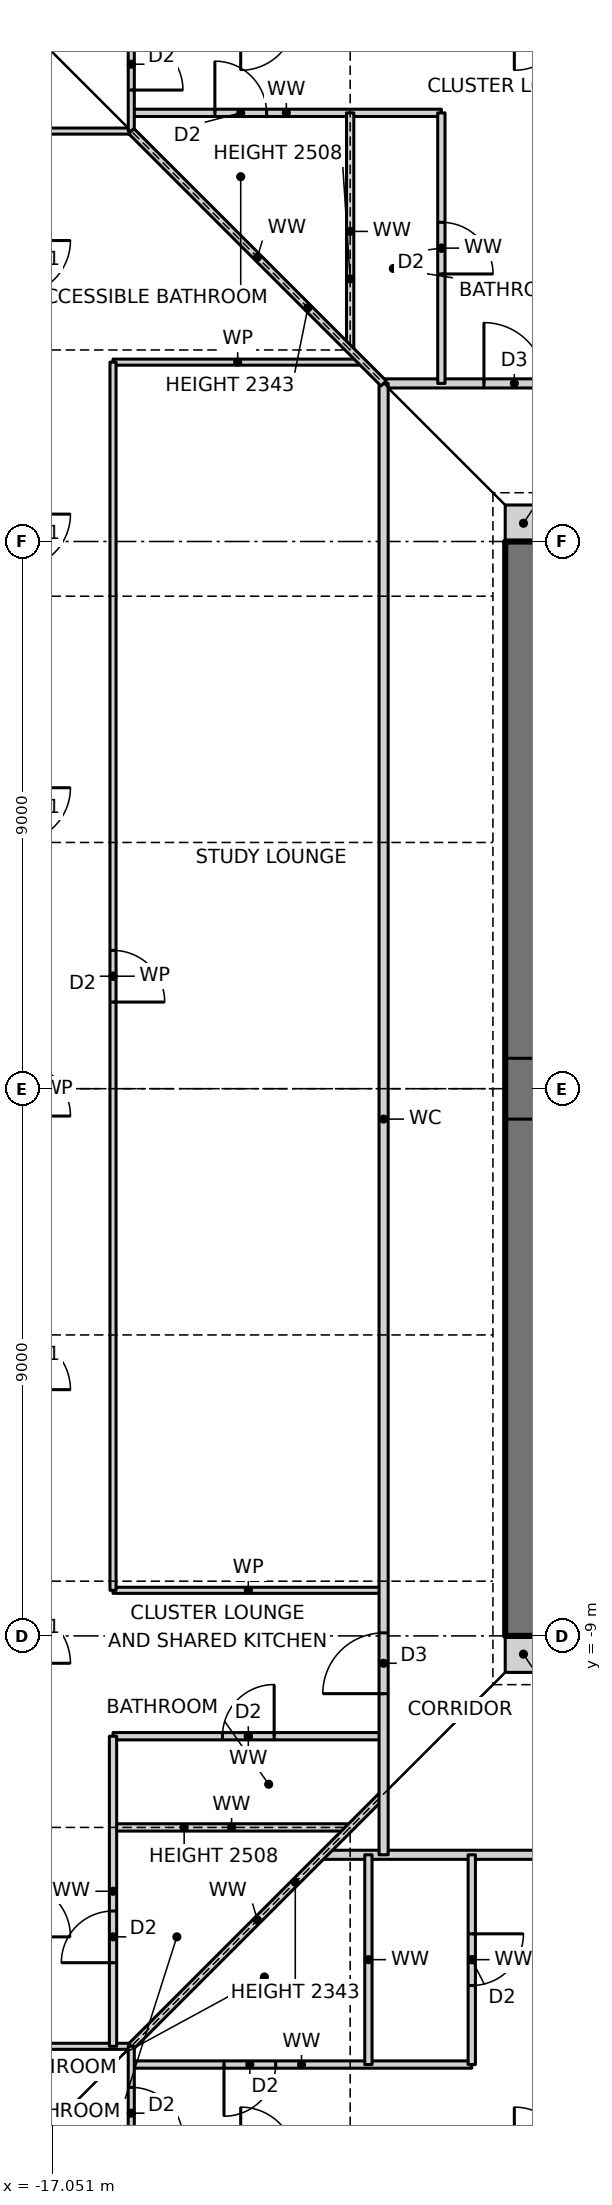
"""IFC4 building model, lengths in metres.
Left out: names, types, materials, properties, quantities, classifications, styles, units other than length and angle.
Written with IfcOpenShell. Run it as: python <this file> out.ifc"""

import sys

from ifc_helpers import new_model, si_unit, direction, frame, frame_2d, origin, place, context, subcontext, project, spatial, rectangle, extrude, element, fill, save


model = new_model("IFC4")
c1 = context("Model", 3, precision=1e-05, world=origin(), true_north=direction((0.0, 1.0)))
c2 = subcontext(c1, "Body", "Model", "MODEL_VIEW")
j1 = project(units=[si_unit("LENGTHUNIT", "METRE"), si_unit("PLANEANGLEUNIT", "RADIAN")], contexts=[c1])
p1 = place(None, origin())
s1 = spatial("IfcSite", under=j1, at=p1, CompositionType="ELEMENT")
p2 = place(p1, origin())
s2 = spatial("IfcBuilding", under=s1, at=p2, CompositionType="ELEMENT")
p3 = place(p2, frame((0.0, 0.0, 18.5)))
s3 = spatial("IfcBuildingStorey", under=s2, at=p3, CompositionType="ELEMENT", Elevation=18.5)
for number, where, z_axis, x_axis in (
    (1, (-9.6, -9.3, 0.0), (0.0, 0.0, 1.0), (1.0, 0.0, 0.0)),
    (2, (-9.6, 9.3, 0.0), (0.0, 0.0, 1.0), (1.0, 0.0, 0.0)),
):
    element("IfcWall", number, at=place(p3, frame(where, z_axis=z_axis, x_axis=x_axis)), inside=s3, PredefinedType="SOLIDWALL", context=c2, shape_type="SweptSolid", body=[
        extrude(rectangle(XDim=0.6, YDim=0.6, at=frame_2d((0.3, 0.0))), origin(), (0.0, 0.0, 1.0), 3.5),
    ])
p4 = place(p3, frame((-9.0, 9.0, 0.0), z_axis=(0.0, 0.0, 1.0), x_axis=(0.0, -1.0, 0.0)))
e3 = element("IfcWall", 3, at=p4, inside=s3, PredefinedType="SHEAR", context=c2, shape_type="SweptSolid", body=[
    extrude(rectangle(XDim=18.0, YDim=1.2, at=frame_2d((9.0, 0.0))), origin(), (0.0, 0.0, 1.0), 3.5),
])
p5 = place(p4, frame((8.5, 0.0, 0.0)))
e4 = element("IfcOpeningElement", 4, at=p5, cuts=e3, PredefinedType="OPENING", context=c2, shape_type="SweptSolid", body=[
    extrude(rectangle(XDim=1.0, YDim=2.1, at=frame_2d((0.5, 1.05))), frame((0.0, 0.61, 0.0), z_axis=(0.0, -1.0, 0.0), x_axis=(1.0, 0.0, 0.0)), (0.0, 0.0, 1.0), 1.22),
])
p6 = place(p3, frame((-15.75, -16.05, 0.0), z_axis=(0.0, 0.0, 1.0), x_axis=(1.0, 0.0, 0.0)))
e5 = element("IfcWall", 5, at=p6, inside=s3, PredefinedType="PARTITIONING", context=c2, shape_type="SweptSolid", body=[
    extrude(rectangle(XDim=5.6, YDim=0.12, at=frame_2d((2.8, 0.0))), origin(), (0.0, 0.0, 1.0), 3.27),
])
p7 = place(p6, frame((1.525, 0.0, 0.0)))
e6 = element("IfcOpeningElement", 6, at=p7, cuts=e5, PredefinedType="OPENING", context=c2, shape_type="SweptSolid", body=[
    extrude(rectangle(XDim=0.85, YDim=2.1, at=frame_2d((0.425, 1.05))), frame((0.0, 0.07, 0.0), z_axis=(0.0, -1.0, 0.0), x_axis=(1.0, 0.0, 0.0)), (0.0, 0.0, 1.0), 0.14),
])
p8 = place(p3, frame((-23.19, -15.75, 0.0), z_axis=(0.0, 0.0, 1.0), x_axis=(1.0, 0.0, 0.0)))
e7 = element("IfcWall", 7, at=p8, inside=s3, PredefinedType="PARTITIONING", context=c2, shape_type="SweptSolid", body=[
    extrude(rectangle(XDim=7.44, YDim=0.1, at=frame_2d((3.72, 0.0))), origin(), (0.0, 0.0, 1.0), 3.27),
])
p9 = place(p3, frame((-12.6, -12.6, 0.0), z_axis=(0.0, 0.0, 1.0), x_axis=(1.0, 0.0, 0.0)))
e8 = element("IfcWall", 8, at=p9, inside=s3, PredefinedType="PARTITIONING", context=c2, shape_type="SweptSolid", body=[
    extrude(rectangle(XDim=25.2, YDim=0.15, at=frame_2d((12.6, 0.0))), origin(), (0.0, 0.0, 1.0), 3.27),
])
p10 = place(p9, frame((8.05, 0.0, 0.0)))
e9 = element("IfcOpeningElement", 9, at=p10, cuts=e8, PredefinedType="OPENING", context=c2, shape_type="SweptSolid", body=[
    extrude(rectangle(XDim=1.0, YDim=2.1, at=frame_2d((0.5, 1.05))), frame((0.0, 0.085, 0.0), z_axis=(0.0, -1.0, 0.0), x_axis=(1.0, 0.0, 0.0)), (0.0, 0.0, 1.0), 0.17),
])
p11 = place(p9, frame((5.3, 0.0, 0.0)))
e10 = element("IfcOpeningElement", 10, at=p11, cuts=e8, PredefinedType="OPENING", context=c2, shape_type="SweptSolid", body=[
    extrude(rectangle(XDim=0.9, YDim=2.1, at=frame_2d((0.45, 1.05))), frame((0.0, 0.085, 0.0), z_axis=(0.0, -1.0, 0.0), x_axis=(1.0, 0.0, 0.0)), (0.0, 0.0, 1.0), 0.17),
])
p12 = place(p3, frame((-16.05, -12.15, 0.0), z_axis=(0.0, 0.0, 1.0), x_axis=(1.0, 0.0, 0.0)))
e11 = element("IfcWall", 11, at=p12, inside=s3, PredefinedType="PARTITIONING", context=c2, shape_type="SweptSolid", body=[
    extrude(rectangle(XDim=3.9, YDim=0.12, at=frame_2d((1.95, 0.0))), origin(), (0.0, 0.0, 1.0), 2.508),
])
p13 = place(p3, frame((-16.05, -10.65, 0.0), z_axis=(0.0, 0.0, 1.0), x_axis=(1.0, 0.0, 0.0)))
e12 = element("IfcWall", 12, at=p13, inside=s3, PredefinedType="PARTITIONING", context=c2, shape_type="SweptSolid", body=[
    extrude(rectangle(XDim=4.45, YDim=0.12, at=frame_2d((2.225, 0.0))), origin(), (0.0, 0.0, 1.0), 3.27),
])
p14 = place(p13, frame((1.8, 0.0, 0.0)))
e13 = element("IfcOpeningElement", 13, at=p14, cuts=e12, PredefinedType="OPENING", context=c2, shape_type="SweptSolid", body=[
    extrude(rectangle(XDim=0.85, YDim=2.1, at=frame_2d((0.425, 1.05))), frame((0.0, 0.07, 0.0), z_axis=(0.0, -1.0, 0.0), x_axis=(1.0, 0.0, 0.0)), (0.0, 0.0, 1.0), 0.14),
])
p15 = place(p3, frame((-16.05, -8.25, 0.0), z_axis=(0.0, 0.0, 1.0), x_axis=(1.0, 0.0, 0.0)))
e14 = element("IfcWall", 14, at=p15, inside=s3, PredefinedType="PARTITIONING", context=c2, shape_type="SweptSolid", body=[
    extrude(rectangle(XDim=4.45, YDim=0.1, at=frame_2d((2.225, 0.0))), origin(), (0.0, 0.0, 1.0), 3.27),
])
p16 = place(p3, frame((-11.6, 11.6, 0.0), z_axis=(0.0, 0.0, 1.0), x_axis=(1.0, 0.0, 0.0)))
e15 = element("IfcWall", 15, at=p16, inside=s3, PredefinedType="PARTITIONING", context=c2, shape_type="SweptSolid", body=[
    extrude(rectangle(XDim=23.2, YDim=0.15, at=frame_2d((11.6, 0.0))), origin(), (0.0, 0.0, 1.0), 3.27),
])
p17 = place(p16, frame((1.65, 0.0, 0.0)))
e16 = element("IfcOpeningElement", 16, at=p17, cuts=e15, PredefinedType="OPENING", context=c2, shape_type="SweptSolid", body=[
    extrude(rectangle(XDim=1.0, YDim=2.1, at=frame_2d((0.5, 1.05))), frame((0.0, 0.085, 0.0), z_axis=(0.0, -1.0, 0.0), x_axis=(1.0, 0.0, 0.0)), (0.0, 0.0, 1.0), 0.17),
])
p18 = place(p3, frame((-16.05, 11.95, 0.0), z_axis=(0.0, 0.0, 1.0), x_axis=(1.0, 0.0, 0.0)))
e17 = element("IfcWall", 17, at=p18, inside=s3, PredefinedType="PARTITIONING", context=c2, shape_type="SweptSolid", body=[
    extrude(rectangle(XDim=4.1, YDim=0.1, at=frame_2d((2.05, 0.0))), origin(), (0.0, 0.0, 1.0), 3.27),
])
p19 = place(p3, frame((-23.19, 15.75, 0.0), z_axis=(0.0, 0.0, 1.0), x_axis=(1.0, 0.0, 0.0)))
e18 = element("IfcWall", 18, at=p19, inside=s3, PredefinedType="PARTITIONING", context=c2, shape_type="SweptSolid", body=[
    extrude(rectangle(XDim=7.44, YDim=0.1, at=frame_2d((3.72, 0.0))), origin(), (0.0, 0.0, 1.0), 3.27),
])
p20 = place(p3, frame((-15.75, 16.05, 0.0), z_axis=(0.0, 0.0, 1.0), x_axis=(1.0, 0.0, 0.0)))
e19 = element("IfcWall", 19, at=p20, inside=s3, PredefinedType="PARTITIONING", context=c2, shape_type="SweptSolid", body=[
    extrude(rectangle(XDim=5.1, YDim=0.12, at=frame_2d((2.55, 0.0))), origin(), (0.0, 0.0, 1.0), 3.27),
])
p21 = place(p20, frame((1.375, 0.0, 0.0)))
e20 = element("IfcOpeningElement", 20, at=p21, cuts=e19, PredefinedType="OPENING", context=c2, shape_type="SweptSolid", body=[
    extrude(rectangle(XDim=0.85, YDim=2.1, at=frame_2d((0.425, 1.05))), frame((0.0, 0.07, 0.0), z_axis=(0.0, -1.0, 0.0), x_axis=(1.0, 0.0, 0.0)), (0.0, 0.0, 1.0), 0.14),
])
p22 = place(p3, frame((-15.75, -15.75, 0.0), z_axis=(0.0, 0.0, 1.0), x_axis=(0.707106781187, 0.707106781187, 0.0)))
e21 = element("IfcWall", 21, at=p22, inside=s3, PredefinedType="PARTITIONING", context=c2, shape_type="SweptSolid", body=[
    extrude(rectangle(XDim=5.869, YDim=0.12, at=frame_2d((2.935, 0.0))), origin(), (0.0, 0.0, 1.0), 2.343),
])
p23 = place(p3, frame((-10.15, -16.05, 0.0), z_axis=(0.0, 0.0, 1.0), x_axis=(0.0, 1.0, 0.0)))
e22 = element("IfcWall", 22, at=p23, inside=s3, PredefinedType="PARTITIONING", context=c2, shape_type="SweptSolid", body=[
    extrude(rectangle(XDim=3.45, YDim=0.12, at=frame_2d((1.725, 0.0))), origin(), (0.0, 0.0, 1.0), 3.27),
])
p24 = place(p23, frame((1.3, 0.0, 0.0)))
e23 = element("IfcOpeningElement", 23, at=p24, cuts=e22, PredefinedType="OPENING", context=c2, shape_type="SweptSolid", body=[
    extrude(rectangle(XDim=0.85, YDim=2.1, at=frame_2d((0.425, 1.05))), frame((0.0, 0.07, 0.0), z_axis=(0.0, -1.0, 0.0), x_axis=(1.0, 0.0, 0.0)), (0.0, 0.0, 1.0), 0.14),
])
p25 = place(p3, frame((-10.65, 11.6, 0.0), z_axis=(0.0, 0.0, 1.0), x_axis=(0.0, 1.0, 0.0)))
e24 = element("IfcWall", 24, at=p25, inside=s3, PredefinedType="PARTITIONING", context=c2, shape_type="SweptSolid", body=[
    extrude(rectangle(XDim=4.45, YDim=0.12, at=frame_2d((2.225, 0.0))), origin(), (0.0, 0.0, 1.0), 3.27),
])
p26 = place(p25, frame((1.8, 0.0, 0.0)))
e25 = element("IfcOpeningElement", 25, at=p26, cuts=e24, PredefinedType="OPENING", context=c2, shape_type="SweptSolid", body=[
    extrude(rectangle(XDim=0.85, YDim=2.1, at=frame_2d((0.425, 1.05))), frame((0.0, 0.07, 0.0), z_axis=(0.0, -1.0, 0.0), x_axis=(1.0, 0.0, 0.0)), (0.0, 0.0, 1.0), 0.14),
])
p27 = place(p3, frame((-11.6, -12.6, 0.0), z_axis=(0.0, 0.0, 1.0), x_axis=(0.0, 1.0, 0.0)))
e26 = element("IfcWall", 26, at=p27, inside=s3, PredefinedType="PARTITIONING", context=c2, shape_type="SweptSolid", body=[
    extrude(rectangle(XDim=24.2, YDim=0.15, at=frame_2d((12.1, 0.0))), origin(), (0.0, 0.0, 1.0), 3.27),
])
p28 = place(p27, frame((2.65, 0.0, 0.0)))
e27 = element("IfcOpeningElement", 27, at=p28, cuts=e26, PredefinedType="OPENING", context=c2, shape_type="SweptSolid", body=[
    extrude(rectangle(XDim=1.0, YDim=2.1, at=frame_2d((0.5, 1.05))), frame((0.0, 0.085, 0.0), z_axis=(0.0, -1.0, 0.0), x_axis=(1.0, 0.0, 0.0)), (0.0, 0.0, 1.0), 0.17),
])
p29 = place(p3, frame((-11.85, -16.05, 0.0), z_axis=(0.0, 0.0, 1.0), x_axis=(0.0, 1.0, 0.0)))
e28 = element("IfcWall", 28, at=p29, inside=s3, PredefinedType="PARTITIONING", context=c2, shape_type="SweptSolid", body=[
    extrude(rectangle(XDim=3.45, YDim=0.12, at=frame_2d((1.725, 0.0))), origin(), (0.0, 0.0, 1.0), 3.27),
])
p30 = place(p3, frame((-12.15, 12.15, 0.0), z_axis=(0.0, 0.0, 1.0), x_axis=(0.0, 1.0, 0.0)))
e29 = element("IfcWall", 29, at=p30, inside=s3, PredefinedType="PARTITIONING", context=c2, shape_type="SweptSolid", body=[
    extrude(rectangle(XDim=3.9, YDim=0.12, at=frame_2d((1.95, 0.0))), origin(), (0.0, 0.0, 1.0), 2.508),
])
p31 = place(p3, frame((-15.75, -23.19, 0.0), z_axis=(0.0, 0.0, 1.0), x_axis=(0.0, 1.0, 0.0)))
e30 = element("IfcWall", 30, at=p31, inside=s3, PredefinedType="PARTITIONING", context=c2, shape_type="SweptSolid", body=[
    extrude(rectangle(XDim=7.44, YDim=0.1, at=frame_2d((3.72, 0.0))), origin(), (0.0, 0.0, 1.0), 3.27),
])
p32 = place(p31, frame((5.915, 0.0, 0.0)))
e31 = element("IfcOpeningElement", 31, at=p32, cuts=e30, PredefinedType="OPENING", context=c2, shape_type="SweptSolid", body=[
    extrude(rectangle(XDim=0.85, YDim=2.1, at=frame_2d((0.425, 1.05))), frame((0.0, 0.06, 0.0), z_axis=(0.0, -1.0, 0.0), x_axis=(1.0, 0.0, 0.0)), (0.0, 0.0, 1.0), 0.12),
])
p33 = place(p3, frame((-15.75, 15.75, 0.0), z_axis=(0.0, 0.0, 1.0), x_axis=(0.0, 1.0, 0.0)))
e32 = element("IfcWall", 32, at=p33, inside=s3, PredefinedType="PARTITIONING", context=c2, shape_type="SweptSolid", body=[
    extrude(rectangle(XDim=7.44, YDim=0.1, at=frame_2d((3.72, 0.0))), origin(), (0.0, 0.0, 1.0), 3.27),
])
p34 = place(p33, frame((0.675, 0.0, 0.0)))
e33 = element("IfcOpeningElement", 33, at=p34, cuts=e32, PredefinedType="OPENING", context=c2, shape_type="SweptSolid", body=[
    extrude(rectangle(XDim=0.85, YDim=2.1, at=frame_2d((0.425, 1.05))), frame((0.0, 0.06, 0.0), z_axis=(0.0, -1.0, 0.0), x_axis=(1.0, 0.0, 0.0)), (0.0, 0.0, 1.0), 0.12),
])
p35 = place(p3, frame((-16.05, -15.75, 0.0), z_axis=(0.0, 0.0, 1.0), x_axis=(0.0, 1.0, 0.0)))
e34 = element("IfcWall", 34, at=p35, inside=s3, PredefinedType="PARTITIONING", context=c2, shape_type="SweptSolid", body=[
    extrude(rectangle(XDim=5.1, YDim=0.12, at=frame_2d((2.55, 0.0))), origin(), (0.0, 0.0, 1.0), 3.27),
])
p36 = place(p35, frame((1.375, 0.0, 0.0)))
e35 = element("IfcOpeningElement", 35, at=p36, cuts=e34, PredefinedType="OPENING", context=c2, shape_type="SweptSolid", body=[
    extrude(rectangle(XDim=0.85, YDim=2.1, at=frame_2d((0.425, 1.05))), frame((0.0, 0.07, 0.0), z_axis=(0.0, -1.0, 0.0), x_axis=(1.0, 0.0, 0.0)), (0.0, 0.0, 1.0), 0.14),
])
p37 = place(p3, frame((-16.05, -8.25, 0.0), z_axis=(0.0, 0.0, 1.0), x_axis=(0.0, 1.0, 0.0)))
e36 = element("IfcWall", 36, at=p37, inside=s3, PredefinedType="PARTITIONING", context=c2, shape_type="SweptSolid", body=[
    extrude(rectangle(XDim=20.2, YDim=0.1, at=frame_2d((10.1, 0.0))), origin(), (0.0, 0.0, 1.0), 3.27),
])
p38 = place(p37, frame((9.675, 0.0, 0.0)))
e37 = element("IfcOpeningElement", 37, at=p38, cuts=e36, PredefinedType="OPENING", context=c2, shape_type="SweptSolid", body=[
    extrude(rectangle(XDim=0.85, YDim=2.1, at=frame_2d((0.425, 1.05))), frame((0.0, 0.06, 0.0), z_axis=(0.0, -1.0, 0.0), x_axis=(1.0, 0.0, 0.0)), (0.0, 0.0, 1.0), 0.12),
])
p39 = place(p3, frame((-11.6, 11.6, 0.0), z_axis=(0.0, 0.0, 1.0), x_axis=(-0.707106781187, 0.707106781187, 0.0)))
e38 = element("IfcWall", 38, at=p39, inside=s3, PredefinedType="PARTITIONING", context=c2, shape_type="SweptSolid", body=[
    extrude(rectangle(XDim=5.869, YDim=0.12, at=frame_2d((2.935, 0.0))), origin(), (0.0, 0.0, 1.0), 2.343),
])
p40 = place(p7, frame((0.85, 0.0, 0.0), z_axis=(0.0, 0.0, 1.0), x_axis=(-1.0, 0.0, 0.0)))
e39 = element("IfcDoor", 39, at=p40, inside=s3, OperationType="SINGLE_SWING_RIGHT", PredefinedType="DOOR", context=c2, shape_type="SweptSolid", body=[
    extrude(rectangle(XDim=0.85, YDim=2.1, at=frame_2d((0.425, 1.05))), frame((0.0, 0.025, 0.0), z_axis=(0.0, -1.0, 0.0), x_axis=(1.0, 0.0, 0.0)), (0.0, 0.0, 1.0), 0.05),
])
fill(e6, e39)
p41 = place(p24, frame((0.85, 0.0, 0.0), z_axis=(0.0, 0.0, 1.0), x_axis=(-1.0, 0.0, 0.0)))
e40 = element("IfcDoor", 40, at=p41, inside=s3, OperationType="SINGLE_SWING_LEFT", PredefinedType="DOOR", context=c2, shape_type="SweptSolid", body=[
    extrude(rectangle(XDim=0.85, YDim=2.1, at=frame_2d((0.425, 1.05))), frame((0.0, 0.025, 0.0), z_axis=(0.0, -1.0, 0.0), x_axis=(1.0, 0.0, 0.0)), (0.0, 0.0, 1.0), 0.05),
])
fill(e23, e40)
p42 = place(p17, origin())
e41 = element("IfcDoor", 41, at=p42, inside=s3, OperationType="SINGLE_SWING_LEFT", PredefinedType="DOOR", context=c2, shape_type="SweptSolid", body=[
    extrude(rectangle(XDim=1.0, YDim=2.1, at=frame_2d((0.5, 1.05))), frame((0.0, 0.025, 0.0), z_axis=(0.0, -1.0, 0.0), x_axis=(1.0, 0.0, 0.0)), (0.0, 0.0, 1.0), 0.05),
])
fill(e16, e41)
p43 = place(p26, frame((0.85, 0.0, 0.0), z_axis=(0.0, 0.0, 1.0), x_axis=(-1.0, 0.0, 0.0)))
e42 = element("IfcDoor", 42, at=p43, inside=s3, OperationType="SINGLE_SWING_RIGHT", PredefinedType="DOOR", context=c2, shape_type="SweptSolid", body=[
    extrude(rectangle(XDim=0.85, YDim=2.1, at=frame_2d((0.425, 1.05))), frame((0.0, 0.025, 0.0), z_axis=(0.0, -1.0, 0.0), x_axis=(1.0, 0.0, 0.0)), (0.0, 0.0, 1.0), 0.05),
])
fill(e25, e42)
p44 = place(p21, origin())
e43 = element("IfcDoor", 43, at=p44, inside=s3, OperationType="SINGLE_SWING_LEFT", PredefinedType="DOOR", context=c2, shape_type="SweptSolid", body=[
    extrude(rectangle(XDim=0.85, YDim=2.1, at=frame_2d((0.425, 1.05))), frame((0.0, 0.025, 0.0), z_axis=(0.0, -1.0, 0.0), x_axis=(1.0, 0.0, 0.0)), (0.0, 0.0, 1.0), 0.05),
])
fill(e20, e43)
p45 = place(p28, origin())
e44 = element("IfcDoor", 44, at=p45, inside=s3, OperationType="SINGLE_SWING_LEFT", PredefinedType="DOOR", context=c2, shape_type="SweptSolid", body=[
    extrude(rectangle(XDim=1.0, YDim=2.1, at=frame_2d((0.5, 1.05))), frame((0.0, 0.025, 0.0), z_axis=(0.0, -1.0, 0.0), x_axis=(1.0, 0.0, 0.0)), (0.0, 0.0, 1.0), 0.05),
])
fill(e27, e44)
p46 = place(p38, frame((0.85, 0.0, 0.0), z_axis=(0.0, 0.0, 1.0), x_axis=(-1.0, 0.0, 0.0)))
e45 = element("IfcDoor", 45, at=p46, inside=s3, OperationType="SINGLE_SWING_RIGHT", PredefinedType="DOOR", context=c2, shape_type="SweptSolid", body=[
    extrude(rectangle(XDim=0.85, YDim=2.1, at=frame_2d((0.425, 1.05))), frame((0.0, 0.025, 0.0), z_axis=(0.0, -1.0, 0.0), x_axis=(1.0, 0.0, 0.0)), (0.0, 0.0, 1.0), 0.05),
])
fill(e37, e45)
p47 = place(p14, origin())
e46 = element("IfcDoor", 46, at=p47, inside=s3, OperationType="SINGLE_SWING_RIGHT", PredefinedType="DOOR", context=c2, shape_type="SweptSolid", body=[
    extrude(rectangle(XDim=0.85, YDim=2.1, at=frame_2d((0.425, 1.05))), frame((0.0, 0.025, 0.0), z_axis=(0.0, -1.0, 0.0), x_axis=(1.0, 0.0, 0.0)), (0.0, 0.0, 1.0), 0.05),
])
fill(e13, e46)
p48 = place(p36, origin())
e47 = element("IfcDoor", 47, at=p48, inside=s3, OperationType="SINGLE_SWING_LEFT", PredefinedType="DOOR", context=c2, shape_type="SweptSolid", body=[
    extrude(rectangle(XDim=0.85, YDim=2.1, at=frame_2d((0.425, 1.05))), frame((0.0, 0.025, 0.0), z_axis=(0.0, -1.0, 0.0), x_axis=(1.0, 0.0, 0.0)), (0.0, 0.0, 1.0), 0.05),
])
fill(e35, e47)
p49 = place(p32, frame((0.85, 0.0, 0.0), z_axis=(0.0, 0.0, 1.0), x_axis=(-1.0, 0.0, 0.0)))
e48 = element("IfcDoor", 48, at=p49, inside=s3, OperationType="SINGLE_SWING_RIGHT", PredefinedType="DOOR", context=c2, shape_type="SweptSolid", body=[
    extrude(rectangle(XDim=0.85, YDim=2.1, at=frame_2d((0.425, 1.05))), frame((0.0, 0.025, 0.0), z_axis=(0.0, -1.0, 0.0), x_axis=(1.0, 0.0, 0.0)), (0.0, 0.0, 1.0), 0.05),
])
fill(e31, e48)
p50 = place(p34, frame((0.85, 0.0, 0.0), z_axis=(0.0, 0.0, 1.0), x_axis=(-1.0, 0.0, 0.0)))
e49 = element("IfcDoor", 49, at=p50, inside=s3, OperationType="SINGLE_SWING_RIGHT", PredefinedType="DOOR", context=c2, shape_type="SweptSolid", body=[
    extrude(rectangle(XDim=0.85, YDim=2.1, at=frame_2d((0.425, 1.05))), frame((0.0, 0.025, 0.0), z_axis=(0.0, -1.0, 0.0), x_axis=(1.0, 0.0, 0.0)), (0.0, 0.0, 1.0), 0.05),
])
fill(e33, e49)
save(model, sys.argv[1])
